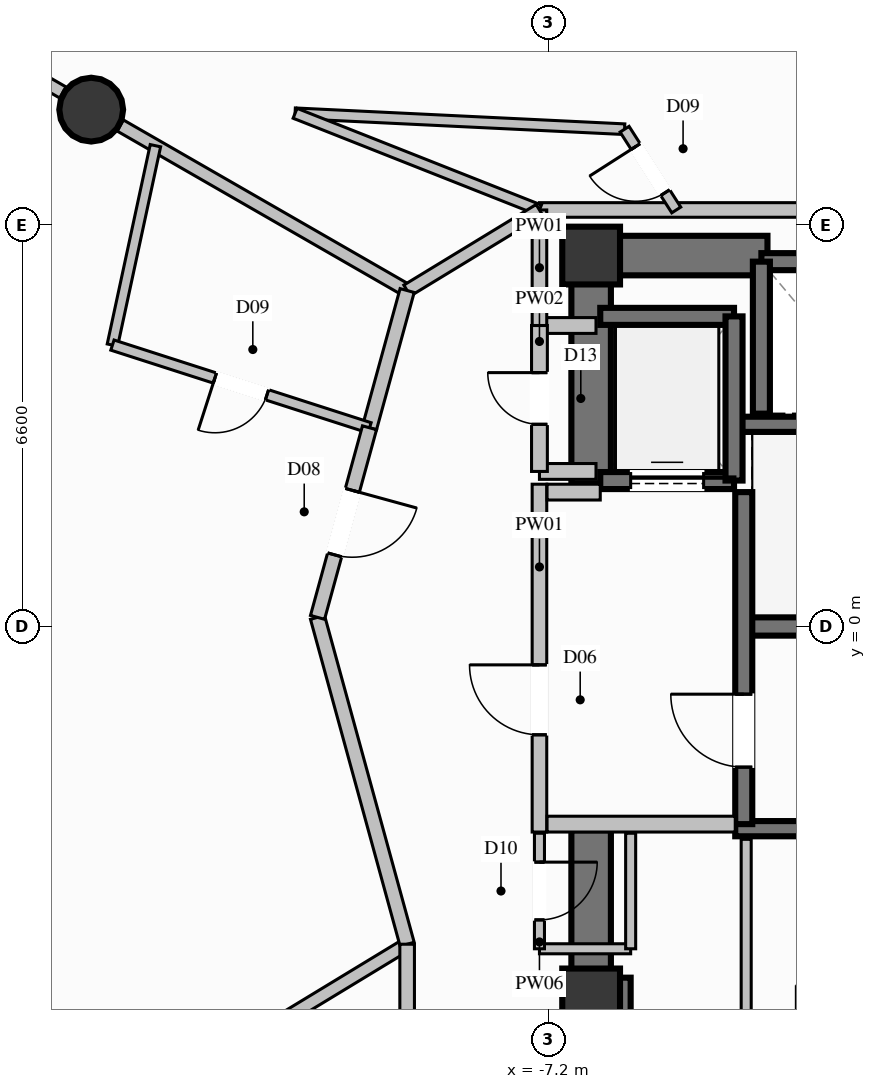
"""IFC4 building model, lengths in metres.
Left out: names, types, materials, properties, quantities, classifications, styles, units other than length and angle.
Written with IfcOpenShell. Run it as: python <this file> out.ifc"""

import sys

from ifc_helpers import new_model, si_unit, direction, frame, frame_2d, origin, origin_2d, place, context, subcontext, project, spatial, rectangle, circle, extrude, element, fill, save


model = new_model("IFC4")
c1 = context("Model", 3, precision=1e-05, world=origin(), true_north=direction((0.0, 1.0)))
c2 = subcontext(c1, "Body", "Model", "MODEL_VIEW")
j1 = project(units=[si_unit("LENGTHUNIT", "METRE"), si_unit("PLANEANGLEUNIT", "RADIAN")], contexts=[c1])
p1 = place(None, origin())
s1 = spatial("IfcSite", under=j1, at=p1, CompositionType="ELEMENT")
p2 = place(p1, origin())
s2 = spatial("IfcBuilding", under=s1, at=p2, CompositionType="ELEMENT")
p3 = place(p2, frame((0.0, 0.0, 113.4)))
s3 = spatial("IfcBuildingStorey", under=s2, at=p3, CompositionType="ELEMENT", Elevation=113.4)
for number, where, z_axis, x_axis in (
    (1, (-6.5, -6.1, 0.0), (0.0, 0.0, 1.0), (1.0, 0.0, 0.0)),
    (2, (-6.5, 6.1, 0.0), (0.0, 0.0, 1.0), (1.0, 0.0, 0.0)),
):
    element("IfcColumn", number, at=place(p3, frame(where, z_axis=z_axis, x_axis=x_axis)), inside=s3, PredefinedType="COLUMN", context=c2, shape_type="SweptSolid", body=[
        extrude(rectangle(XDim=0.95, YDim=0.95, at=origin_2d()), origin(), (0.0, 0.0, 1.0), 3.6),
    ])
p4 = place(p3, frame((-3.99, 0.0, 0.0), z_axis=(0.0, 0.0, 1.0), x_axis=(1.0, 0.0, 0.0)))
e3 = element("IfcWall", 3, at=p4, inside=s3, PredefinedType="SHEAR", context=c2, shape_type="SweptSolid", body=[
    extrude(rectangle(XDim=7.98, YDim=0.3, at=frame_2d((3.99, 0.0))), origin(), (0.0, 0.0, 1.0), 3.6),
])
for number, where, z_axis, x_axis in (
    (4, (-4.13, -3.325, 0.0), (0.0, 0.0, 1.0), (1.0, 0.0, 0.0)),
    (5, (-4.13, 3.325, 0.0), (0.0, 0.0, 1.0), (1.0, 0.0, 0.0)),
):
    element("IfcWall", number, at=place(p3, frame(where, z_axis=z_axis, x_axis=x_axis)), inside=s3, PredefinedType="SOLIDWALL", context=c2, shape_type="SweptSolid", body=[
        extrude(rectangle(XDim=8.26, YDim=0.25, at=frame_2d((4.13, 0.0))), origin(), (0.0, 0.0, 1.0), 3.6),
    ])
p5 = place(p3, frame((-6.175, -6.1, 0.0), z_axis=(0.0, 0.0, 1.0), x_axis=(1.0, 0.0, 0.0)))
e6 = element("IfcWall", 6, at=p5, inside=s3, PredefinedType="SHEAR", context=c2, shape_type="SweptSolid", body=[
    extrude(rectangle(XDim=0.325, YDim=0.65, at=frame_2d((0.163, 0.0))), origin(), (0.0, 0.0, 1.0), 3.6),
])
p6 = place(p3, frame((-6.175, 6.1, 0.0), z_axis=(0.0, 0.0, 1.0), x_axis=(1.0, 0.0, 0.0)))
e7 = element("IfcWall", 7, at=p6, inside=s3, PredefinedType="SHEAR", context=c2, shape_type="SweptSolid", body=[
    extrude(rectangle(XDim=2.575, YDim=0.65, at=frame_2d((1.288, 0.0))), origin(), (0.0, 0.0, 1.0), 3.6),
])
p7 = place(p3, frame((-6.5, 2.35, 0.0), z_axis=(0.0, 0.0, 1.0), x_axis=(0.0, 1.0, 0.0)))
e8 = element("IfcWall", 8, at=p7, inside=s3, PredefinedType="SHEAR", context=c2, shape_type="SweptSolid", body=[
    extrude(rectangle(XDim=4.075, YDim=0.65, at=frame_2d((2.038, 0.0))), origin(), (0.0, 0.0, 1.0), 3.6),
])
p8 = place(p3, frame((-6.5, -6.425, 0.0), z_axis=(0.0, 0.0, 1.0), x_axis=(0.0, 1.0, 0.0)))
e9 = element("IfcWall", 9, at=p8, inside=s3, PredefinedType="SHEAR", context=c2, shape_type="SweptSolid", body=[
    extrude(rectangle(XDim=3.075, YDim=0.65, at=frame_2d((1.538, 0.0))), origin(), (0.0, 0.0, 1.0), 3.6),
])
p9 = place(p3, frame((-14.722, 8.5, 0.0), z_axis=(0.0, 0.0, 1.0), x_axis=(1.0, 0.0, 0.0)))
e10 = element("IfcColumn", 10, at=p9, inside=s3, PredefinedType="COLUMN", context=c2, shape_type="SweptSolid", body=[
    extrude(circle(Radius=0.525, at=origin_2d()), origin(), (0.0, 0.0, 1.0), 3.6),
])
p10 = place(p3, frame((-1.6, 6.0, 0.0), z_axis=(0.0, 0.0, 1.0), x_axis=(-1.0, 0.0, 0.0)))
e11 = element("IfcWall", 11, at=p10, inside=s3, PredefinedType="SOLIDWALL", context=c2, shape_type="SweptSolid", body=[
    extrude(rectangle(XDim=2.1, YDim=0.28, at=frame_2d((1.05, 0.0))), origin(), (0.0, 0.0, 1.0), 3.35),
])
p11 = place(p3, frame((-3.7, 6.0, 0.0), z_axis=(0.0, 0.0, 1.0), x_axis=(0.0, -1.0, 0.0)))
e12 = element("IfcWall", 12, at=p11, inside=s3, PredefinedType="SOLIDWALL", context=c2, shape_type="SweptSolid", body=[
    extrude(rectangle(XDim=2.5, YDim=0.28, at=frame_2d((1.25, 0.0))), origin(), (0.0, 0.0, 1.0), 3.35),
])
p12 = place(p3, frame((-6.35, 2.4, 0.0), z_axis=(0.0, 0.0, 1.0), x_axis=(1.0, 0.0, 0.0)))
e13 = element("IfcWall", 13, at=p12, inside=s3, PredefinedType="SOLIDWALL", context=c2, shape_type="SweptSolid", body=[
    extrude(rectangle(XDim=2.2, YDim=0.28, at=frame_2d((1.1, 0.0))), origin(), (0.0, 0.0, 1.0), 3.35),
])
p13 = place(p12, frame((0.5, 0.0, 0.0)))
e14 = element("IfcOpeningElement", 14, at=p13, cuts=e13, PredefinedType="OPENING", context=c2, shape_type="SweptSolid", body=[
    extrude(rectangle(XDim=1.2, YDim=2.2, at=frame_2d((0.6, 1.1))), frame((0.0, 0.15, 0.0), z_axis=(0.0, -1.0, 0.0), x_axis=(1.0, 0.0, 0.0)), (0.0, 0.0, 1.0), 0.3),
])
p14 = place(p3, frame((-4.15, 5.1, 0.0), z_axis=(0.0, 0.0, 1.0), x_axis=(-1.0, 0.0, 0.0)))
e15 = element("IfcWall", 15, at=p14, inside=s3, PredefinedType="SOLIDWALL", context=c2, shape_type="SweptSolid", body=[
    extrude(rectangle(XDim=2.2, YDim=0.28, at=frame_2d((1.1, 0.0))), origin(), (0.0, 0.0, 1.0), 3.35),
])
p15 = place(p3, frame((-4.15, 2.4, 0.0), z_axis=(0.0, 0.0, 1.0), x_axis=(0.0, 1.0, 0.0)))
e16 = element("IfcWall", 16, at=p15, inside=s3, PredefinedType="SOLIDWALL", context=c2, shape_type="SweptSolid", body=[
    extrude(rectangle(XDim=2.7, YDim=0.28, at=frame_2d((1.35, 0.0))), origin(), (0.0, 0.0, 1.0), 3.35),
])
p16 = place(p3, frame((-3.99, -3.25, 0.0), z_axis=(0.0, 0.0, 1.0), x_axis=(0.0, 1.0, 0.0)))
e17 = element("IfcWall", 17, at=p16, inside=s3, PredefinedType="SOLIDWALL", context=c2, shape_type="SweptSolid", body=[
    extrude(rectangle(XDim=5.46, YDim=0.28, at=frame_2d((2.73, 0.0))), origin(), (0.0, 0.0, 1.0), 3.35),
])
p17 = place(p16, frame((0.937, 0.0, 0.0)))
e18 = element("IfcOpeningElement", 18, at=p17, cuts=e17, PredefinedType="OPENING", context=c2, shape_type="SweptSolid", body=[
    extrude(rectangle(XDim=1.2, YDim=2.2, at=frame_2d((0.6, 1.1))), frame((0.0, 0.15, 0.0), z_axis=(0.0, -1.0, 0.0), x_axis=(1.0, 0.0, 0.0)), (0.0, 0.0, 1.0), 0.3),
])
p18 = place(p3, frame((-7.35, -3.38, 0.0), z_axis=(0.0, 0.0, 1.0), x_axis=(0.0, 1.0, 0.0)))
e19 = element("IfcWall", 19, at=p18, inside=s3, PredefinedType="PARTITIONING", context=c2, shape_type="SweptSolid", body=[
    extrude(rectangle(XDim=5.72, YDim=0.24, at=frame_2d((2.86, 0.0))), origin(), (0.0, 0.0, 1.0), 2.435),
])
p19 = place(p18, frame((1.599, 0.0, 0.0)))
e20 = element("IfcOpeningElement", 20, at=p19, cuts=e19, PredefinedType="OPENING", context=c2, shape_type="SweptSolid", body=[
    extrude(rectangle(XDim=1.15, YDim=2.2, at=frame_2d((0.575, 1.1))), frame((0.0, 0.13, 0.0), z_axis=(0.0, -1.0, 0.0), x_axis=(1.0, 0.0, 0.0)), (0.0, 0.0, 1.0), 0.26),
])
p20 = place(p3, frame((-7.225, -3.25, 0.0), z_axis=(0.0, 0.0, 1.0), x_axis=(1.0, 0.0, 0.0)))
e21 = element("IfcWall", 21, at=p20, inside=s3, PredefinedType="PARTITIONING", context=c2, shape_type="SweptSolid", body=[
    extrude(rectangle(XDim=3.095, YDim=0.26, at=frame_2d((1.548, 0.0))), origin(), (0.0, 0.0, 1.0), 3.35),
])
p21 = place(p3, frame((-7.225, 2.21, 0.0), z_axis=(0.0, 0.0, 1.0), x_axis=(1.0, 0.0, 0.0)))
e22 = element("IfcWall", 22, at=p21, inside=s3, PredefinedType="PARTITIONING", context=c2, shape_type="SweptSolid", body=[
    extrude(rectangle(XDim=0.875, YDim=0.26, at=frame_2d((0.438, 0.0))), origin(), (0.0, 0.0, 1.0), 3.35),
])
for number, where, z_axis, x_axis in (
    (23, (-7.35, 4.95, 0.0), (0.0, 0.0, 1.0), (1.0, 0.0, 0.0)),
    (24, (-7.35, 2.55, 0.0), (0.0, 0.0, 1.0), (1.0, 0.0, 0.0)),
):
    element("IfcWall", number, at=place(p3, frame(where, z_axis=z_axis, x_axis=x_axis)), inside=s3, PredefinedType="PARTITIONING", context=c2, shape_type="SweptSolid", body=[
        extrude(rectangle(XDim=0.93, YDim=0.26, at=frame_2d((0.465, 0.0))), origin(), (0.0, 0.0, 1.0), 3.35),
    ])
p22 = place(p3, frame((-7.35, 2.55, 0.0), z_axis=(0.0, 0.0, 1.0), x_axis=(0.0, 1.0, 0.0)))
e25 = element("IfcWall", 25, at=p22, inside=s3, PredefinedType="PARTITIONING", context=c2, shape_type="SweptSolid", body=[
    extrude(rectangle(XDim=2.4, YDim=0.26, at=frame_2d((1.2, 0.0))), origin(), (0.0, 0.0, 1.0), 2.435),
])
p23 = place(p22, frame((0.775, 0.0, 0.0)))
e26 = element("IfcOpeningElement", 26, at=p23, cuts=e25, PredefinedType="OPENING", context=c2, shape_type="SweptSolid", body=[
    extrude(rectangle(XDim=0.85, YDim=2.05, at=frame_2d((0.425, 1.025))), frame((0.0, 0.14, 0.0), z_axis=(0.0, -1.0, 0.0), x_axis=(1.0, 0.0, 0.0)), (0.0, 0.0, 1.0), 0.28),
])
p24 = place(p3, frame((-7.35, 6.85, 0.0), z_axis=(0.0, 0.0, 1.0), x_axis=(1.0, 0.0, 0.0)))
e27 = element("IfcWall", 27, at=p24, inside=s3, PredefinedType="PARTITIONING", context=c2, shape_type="SweptSolid", body=[
    extrude(rectangle(XDim=14.7, YDim=0.24, at=frame_2d((7.35, 0.0))), origin(), (0.0, 0.0, 1.0), 2.435),
])
p25 = place(p3, frame((-7.35, 4.95, 0.0), z_axis=(0.0, 0.0, 1.0), x_axis=(0.0, 1.0, 0.0)))
e28 = element("IfcWall", 28, at=p25, inside=s3, PredefinedType="PARTITIONING", context=c2, shape_type="SweptSolid", body=[
    extrude(rectangle(XDim=1.9, YDim=0.24, at=frame_2d((0.95, 0.0))), origin(), (0.0, 0.0, 1.0), 2.435),
])
p26 = place(p3, frame((-7.35, -5.3, 0.0), z_axis=(0.0, 0.0, 1.0), x_axis=(1.0, 0.0, 0.0)))
e29 = element("IfcWall", 29, at=p26, inside=s3, PredefinedType="PARTITIONING", context=c2, shape_type="SweptSolid", body=[
    extrude(rectangle(XDim=1.5, YDim=0.165, at=frame_2d((0.75, 0.0))), origin(), (0.0, 0.0, 1.0), 2.435),
])
p27 = place(p3, frame((-5.85, -5.3, 0.0), z_axis=(0.0, 0.0, 1.0), x_axis=(0.0, 1.0, 0.0)))
e30 = element("IfcWall", 30, at=p27, inside=s3, PredefinedType="PARTITIONING", context=c2, shape_type="SweptSolid", body=[
    extrude(rectangle(XDim=1.9, YDim=0.165, at=frame_2d((0.95, 0.0))), origin(), (0.0, 0.0, 1.0), 2.435),
])
p28 = place(p3, frame((-7.35, -3.4, 0.0), z_axis=(0.0, 0.0, 1.0), x_axis=(0.0, -1.0, 0.0)))
e31 = element("IfcWall", 31, at=p28, inside=s3, PredefinedType="PARTITIONING", context=c2, shape_type="SweptSolid", body=[
    extrude(rectangle(XDim=1.9, YDim=0.165, at=frame_2d((0.95, 0.0))), origin(), (0.0, 0.0, 1.0), 3.35),
])
p29 = place(p28, frame((0.475, 0.0, 0.0)))
e32 = element("IfcOpeningElement", 32, at=p29, cuts=e31, PredefinedType="OPENING", context=c2, shape_type="SweptSolid", body=[
    extrude(rectangle(XDim=0.95, YDim=2.1, at=frame_2d((0.475, 1.05))), frame((0.0, 0.093, 0.0), z_axis=(0.0, -1.0, 0.0), x_axis=(1.0, 0.0, 0.0)), (0.0, 0.0, 1.0), 0.185),
])
p30 = place(p3, frame((-3.95, -3.5, 0.0), z_axis=(0.0, 0.0, 1.0), x_axis=(0.0, -1.0, 0.0)))
e33 = element("IfcWall", 33, at=p30, inside=s3, PredefinedType="PARTITIONING", context=c2, shape_type="SweptSolid", body=[
    extrude(rectangle(XDim=3.35, YDim=0.165, at=frame_2d((1.675, 0.0))), origin(), (0.0, 0.0, 1.0), 3.35),
])
p31 = place(p3, frame((-9.526, 5.525, 0.0), z_axis=(0.0, 0.0, 1.0), x_axis=(-0.866806949329, 0.498643873516, 0.0)))
e34 = element("IfcWall", 34, at=p31, inside=s3, PredefinedType="PARTITIONING", context=c2, shape_type="SweptSolid", body=[
    extrude(rectangle(XDim=5.443, YDim=0.21, at=frame_2d((2.721, 0.0))), origin(), (0.0, 0.0, 1.0), 2.718),
])
p32 = place(p3, frame((-15.188, 8.782, 0.0), z_axis=(0.0, 0.0, 1.0), x_axis=(-0.866759918317, 0.498725619954, 0.0)))
e35 = element("IfcWall", 35, at=p32, inside=s3, PredefinedType="PARTITIONING", context=c2, shape_type="SweptSolid", body=[
    extrude(rectangle(XDim=7.515, YDim=0.21, at=frame_2d((3.758, 0.0))), origin(), (0.0, 0.0, 1.0), 3.35),
])
p33 = place(p3, frame((-9.526, -5.225, 0.0), z_axis=(0.0, 0.0, 1.0), x_axis=(-0.854837879537, -0.518895172178, 0.0)))
e36 = element("IfcWall", 36, at=p33, inside=s3, PredefinedType="PARTITIONING", context=c2, shape_type="SweptSolid", body=[
    extrude(rectangle(XDim=5.606, YDim=0.21, at=frame_2d((2.803, 0.0))), origin(), (0.0, 0.0, 1.0), 2.718),
])
p34 = place(p3, frame((-11.369, 8.44, 0.0), z_axis=(0.0, 0.0, 1.0), x_axis=(0.998833567436, -0.048285655878, 0.0)))
e37 = element("IfcWall", 37, at=p34, inside=s3, PredefinedType="PLUMBINGWALL", context=c2, shape_type="SweptSolid", body=[
    extrude(rectangle(XDim=5.425, YDim=0.175, at=frame_2d((2.713, 0.0))), origin(), (0.0, 0.0, 1.0), 3.35),
])
p35 = place(p3, frame((-11.369, 8.44, 0.0), z_axis=(0.0, 0.0, 1.0), x_axis=(0.929880296265, -0.367862249516, 0.0)))
e38 = element("IfcWall", 38, at=p35, inside=s3, PredefinedType="PLUMBINGWALL", context=c2, shape_type="SweptSolid", body=[
    extrude(rectangle(XDim=4.322, YDim=0.175, at=frame_2d((2.161, 0.0))), origin(), (0.0, 0.0, 1.0), 2.718),
])
p36 = place(p3, frame((-5.1, 6.85, 0.0), z_axis=(0.0, 0.0, 1.0), x_axis=(-0.539058090776, 0.84226858826, 0.0)))
e39 = element("IfcWall", 39, at=p36, inside=s3, PredefinedType="PLUMBINGWALL", context=c2, shape_type="SweptSolid", body=[
    extrude(rectangle(XDim=1.577, YDim=0.175, at=frame_2d((0.788, 0.0))), origin(), (0.0, 0.0, 1.0), 3.35),
])
p37 = place(p36, frame((0.338, 0.0, 0.0)))
e40 = element("IfcOpeningElement", 40, at=p37, cuts=e39, PredefinedType="OPENING", context=c2, shape_type="SweptSolid", body=[
    extrude(rectangle(XDim=0.9, YDim=2.1, at=frame_2d((0.45, 1.05))), frame((0.0, 0.098, 0.0), z_axis=(0.0, -1.0, 0.0), x_axis=(1.0, 0.0, 0.0)), (0.0, 0.0, 1.0), 0.195),
])
p38 = place(p3, frame((-9.526, 5.525, 0.0), z_axis=(0.0, 0.0, 1.0), x_axis=(0.854057882133, 0.520177982969, 0.0)))
e41 = element("IfcWall", 41, at=p38, inside=s3, PredefinedType="PARTITIONING", context=c2, shape_type="SweptSolid", body=[
    extrude(rectangle(XDim=2.548, YDim=0.21, at=frame_2d((1.274, 0.0))), origin(), (0.0, 0.0, 1.0), 3.35),
])
p39 = place(p3, frame((-9.526, 5.525, 0.0), z_axis=(0.0, 0.0, 1.0), x_axis=(-0.264564800962, -0.964367910132, 0.0)))
e42 = element("IfcWall", 42, at=p39, inside=s3, PredefinedType="PARTITIONING", context=c2, shape_type="SweptSolid", body=[
    extrude(rectangle(XDim=2.34, YDim=0.24, at=frame_2d((1.17, 0.0))), origin(), (0.0, 0.0, 1.0), 3.35),
])
p40 = place(p3, frame((-13.666, 7.907, 0.0), z_axis=(0.0, 0.0, 1.0), x_axis=(-0.210776507194, -0.977534277668, 0.0)))
e43 = element("IfcWall", 43, at=p40, inside=s3, PredefinedType="PLUMBINGWALL", context=c2, shape_type="SweptSolid", body=[
    extrude(rectangle(XDim=3.354, YDim=0.175, at=frame_2d((1.677, 0.0))), origin(), (0.0, 0.0, 1.0), 3.35),
])
p41 = place(p3, frame((-10.145, 3.268, 0.0), z_axis=(0.0, 0.0, 1.0), x_axis=(-0.95197249486, 0.306183554473, 0.0)))
e44 = element("IfcWall", 44, at=p41, inside=s3, PredefinedType="PLUMBINGWALL", context=c2, shape_type="SweptSolid", body=[
    extrude(rectangle(XDim=4.441, YDim=0.175, at=frame_2d((2.221, 0.0))), origin(), (0.0, 0.0, 1.0), 3.35),
])
p42 = place(p41, frame((1.771, 0.0, 0.0)))
e45 = element("IfcOpeningElement", 45, at=p42, cuts=e44, PredefinedType="OPENING", context=c2, shape_type="SweptSolid", body=[
    extrude(rectangle(XDim=0.9, YDim=2.1, at=frame_2d((0.45, 1.05))), frame((0.0, 0.098, 0.0), z_axis=(0.0, -1.0, 0.0), x_axis=(1.0, 0.0, 0.0)), (0.0, 0.0, 1.0), 0.195),
])
p43 = place(p3, frame((-11.0, 0.15, 0.0), z_axis=(0.0, 0.0, 1.0), x_axis=(0.264488542062, -0.964388827765, 0.0)))
e46 = element("IfcWall", 46, at=p43, inside=s3, PredefinedType="PARTITIONING", context=c2, shape_type="SweptSolid", body=[
    extrude(rectangle(XDim=5.573, YDim=0.24, at=frame_2d((2.787, 0.0))), origin(), (0.0, 0.0, 1.0), 3.35),
])
p44 = place(p3, frame((-10.145, 3.268, 0.0), z_axis=(0.0, 0.0, 1.0), x_axis=(-0.264433345006, -0.96440396414, 0.0)))
e47 = element("IfcWall", 47, at=p44, inside=s3, PredefinedType="PARTITIONING", context=c2, shape_type="SweptSolid", body=[
    extrude(rectangle(XDim=3.233, YDim=0.24, at=frame_2d((1.617, 0.0))), origin(), (0.0, 0.0, 1.0), 3.35),
])
p45 = place(p44, frame((1.067, 0.0, 0.0)))
e48 = element("IfcOpeningElement", 48, at=p45, cuts=e47, PredefinedType="OPENING", context=c2, shape_type="SweptSolid", body=[
    extrude(rectangle(XDim=1.1, YDim=2.3, at=frame_2d((0.55, 1.15))), frame((0.0, 0.13, 0.0), z_axis=(0.0, -1.0, 0.0), x_axis=(1.0, 0.0, 0.0)), (0.0, 0.0, 1.0), 0.26),
])
p46 = place(p3, frame((-9.526, -5.225, 0.0), z_axis=(0.0, 0.0, 1.0), x_axis=(0.0, -1.0, 0.0)))
e49 = element("IfcWall", 49, at=p46, inside=s3, PredefinedType="PARTITIONING", context=c2, shape_type="SweptSolid", body=[
    extrude(rectangle(XDim=3.525, YDim=0.24, at=frame_2d((1.762, 0.0))), origin(), (0.0, 0.0, 1.0), 3.35),
])
p47 = place(p13, origin())
e50 = element("IfcDoor", 50, at=p47, inside=s3, OperationType="SLIDING_TO_LEFT", PredefinedType="DOOR", context=c2, shape_type="SweptSolid", body=[
    extrude(rectangle(XDim=1.2, YDim=2.2, at=frame_2d((0.6, 1.1))), frame((0.0, 0.025, 0.0), z_axis=(0.0, -1.0, 0.0), x_axis=(1.0, 0.0, 0.0)), (0.0, 0.0, 1.0), 0.05),
])
fill(e14, e50)
p48 = place(p17, origin())
e51 = element("IfcDoor", 51, at=p48, inside=s3, OperationType="SINGLE_SWING_RIGHT", PredefinedType="DOOR", context=c2, shape_type="SweptSolid", body=[
    extrude(rectangle(XDim=1.2, YDim=2.2, at=frame_2d((0.6, 1.1))), frame((0.0, 0.025, 0.0), z_axis=(0.0, -1.0, 0.0), x_axis=(1.0, 0.0, 0.0)), (0.0, 0.0, 1.0), 0.05),
])
fill(e18, e51)
p49 = place(p19, origin())
e52 = element("IfcDoor", 52, at=p49, inside=s3, OperationType="SINGLE_SWING_RIGHT", PredefinedType="DOOR", context=c2, shape_type="SweptSolid", body=[
    extrude(rectangle(XDim=1.15, YDim=2.2, at=frame_2d((0.575, 1.1))), frame((0.0, 0.025, 0.0), z_axis=(0.0, -1.0, 0.0), x_axis=(1.0, 0.0, 0.0)), (0.0, 0.0, 1.0), 0.05),
])
fill(e20, e52)
p50 = place(p23, origin())
e53 = element("IfcDoor", 53, at=p50, inside=s3, OperationType="SINGLE_SWING_RIGHT", PredefinedType="DOOR", context=c2, shape_type="SweptSolid", body=[
    extrude(rectangle(XDim=0.85, YDim=2.05, at=frame_2d((0.425, 1.025))), frame((0.0, 0.025, 0.0), z_axis=(0.0, -1.0, 0.0), x_axis=(1.0, 0.0, 0.0)), (0.0, 0.0, 1.0), 0.05),
])
fill(e26, e53)
p51 = place(p29, origin())
e54 = element("IfcDoor", 54, at=p51, inside=s3, OperationType="SINGLE_SWING_LEFT", PredefinedType="DOOR", context=c2, shape_type="SweptSolid", body=[
    extrude(rectangle(XDim=0.95, YDim=2.1, at=frame_2d((0.475, 1.05))), frame((0.0, 0.025, 0.0), z_axis=(0.0, -1.0, 0.0), x_axis=(1.0, 0.0, 0.0)), (0.0, 0.0, 1.0), 0.05),
])
fill(e32, e54)
p52 = place(p37, origin())
e55 = element("IfcDoor", 55, at=p52, inside=s3, OperationType="SINGLE_SWING_RIGHT", PredefinedType="DOOR", context=c2, shape_type="SweptSolid", body=[
    extrude(rectangle(XDim=0.9, YDim=2.1, at=frame_2d((0.45, 1.05))), frame((0.0, 0.025, 0.0), z_axis=(0.0, -1.0, 0.0), x_axis=(1.0, 0.0, 0.0)), (0.0, 0.0, 1.0), 0.05),
])
fill(e40, e55)
p53 = place(p42, origin())
e56 = element("IfcDoor", 56, at=p53, inside=s3, OperationType="SINGLE_SWING_RIGHT", PredefinedType="DOOR", context=c2, shape_type="SweptSolid", body=[
    extrude(rectangle(XDim=0.9, YDim=2.1, at=frame_2d((0.45, 1.05))), frame((0.0, 0.025, 0.0), z_axis=(0.0, -1.0, 0.0), x_axis=(1.0, 0.0, 0.0)), (0.0, 0.0, 1.0), 0.05),
])
fill(e45, e56)
p54 = place(p45, origin())
e57 = element("IfcDoor", 57, at=p54, inside=s3, OperationType="SINGLE_SWING_LEFT", PredefinedType="DOOR", context=c2, shape_type="SweptSolid", body=[
    extrude(rectangle(XDim=1.1, YDim=2.3, at=frame_2d((0.55, 1.15))), frame((0.0, 0.025, 0.0), z_axis=(0.0, -1.0, 0.0), x_axis=(1.0, 0.0, 0.0)), (0.0, 0.0, 1.0), 0.05),
])
fill(e48, e57)
save(model, sys.argv[1])
